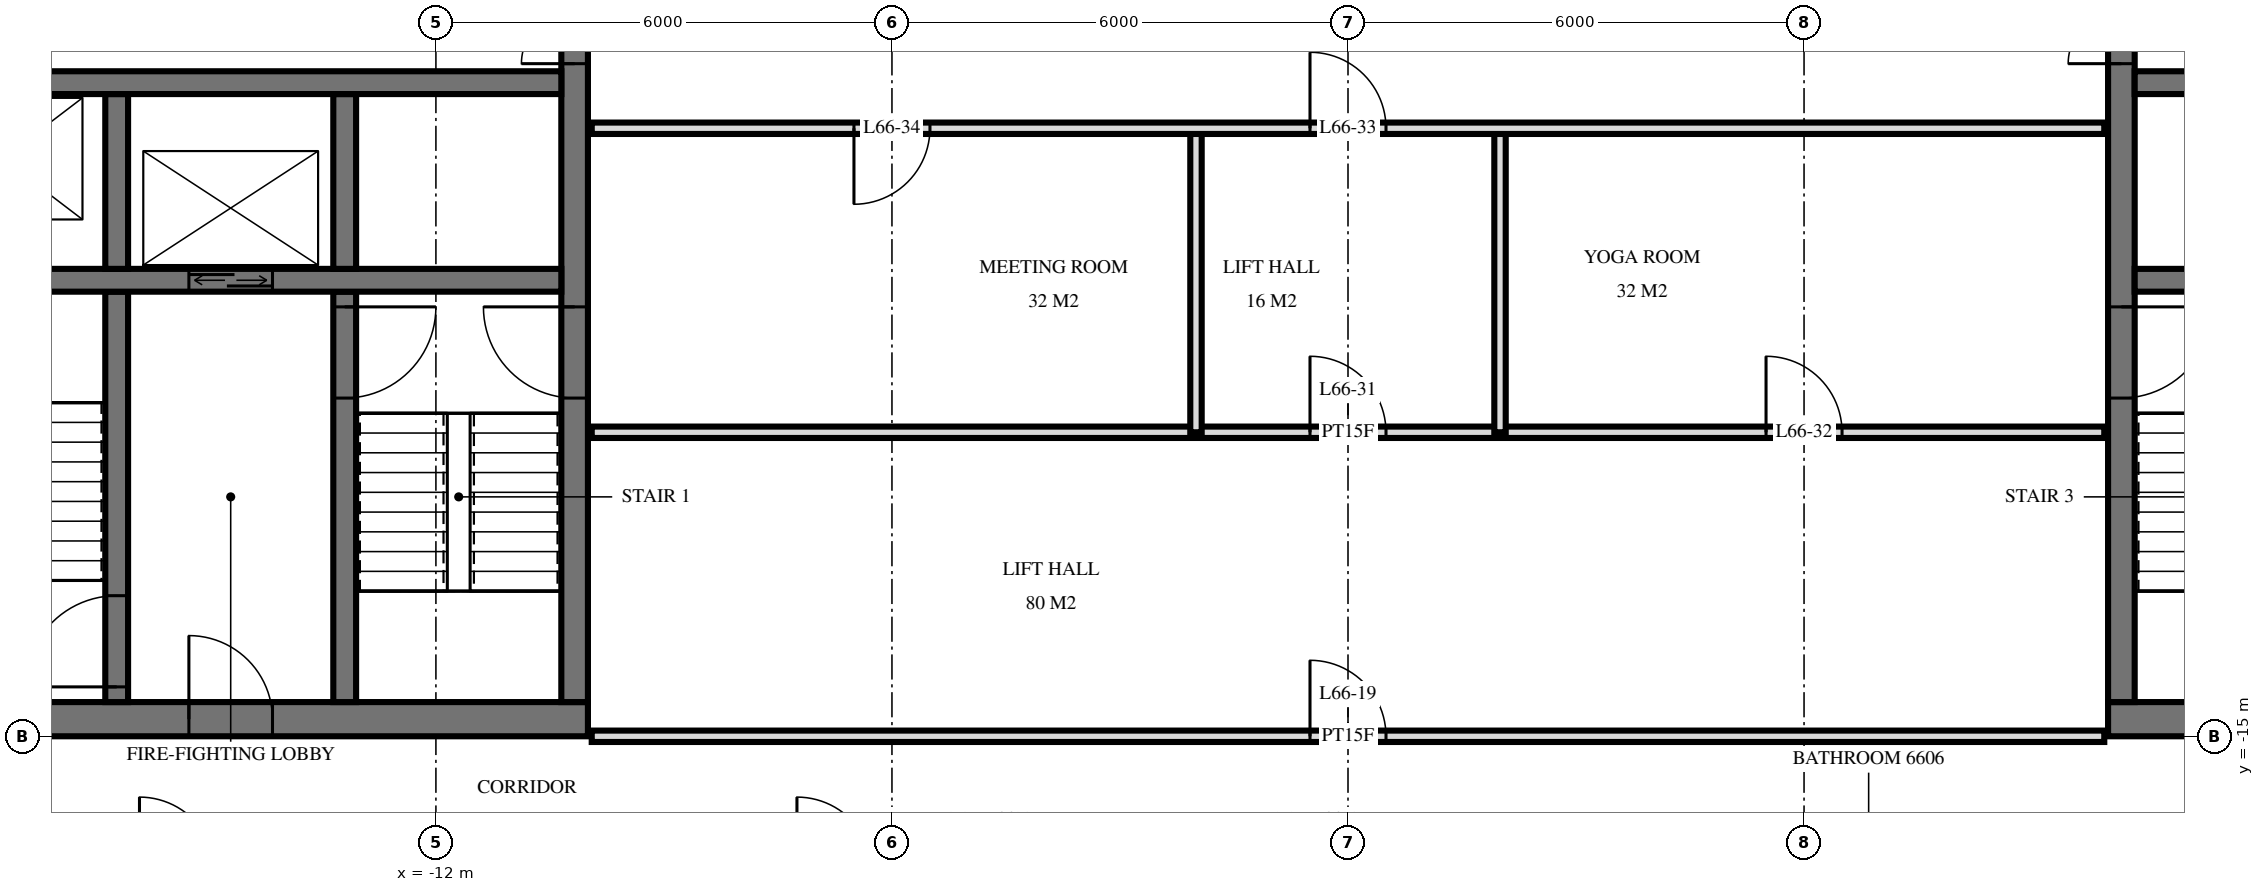
"""IFC4 building model, lengths in metres.
Left out: names, types, materials, properties, quantities, classifications, styles, units other than length and angle.
Written with IfcOpenShell. Run it as: python <this file> out.ifc"""

import sys

from ifc_helpers import new_model, si_unit, direction, frame, frame_2d, origin, place, context, subcontext, project, spatial, rectangle, extrude, element, fill, save


model = new_model("IFC4")
c1 = context("Model", 3, precision=1e-05, world=origin(), true_north=direction((0.0, 1.0)))
c2 = subcontext(c1, "Body", "Model", "MODEL_VIEW")
j1 = project(units=[si_unit("LENGTHUNIT", "METRE"), si_unit("PLANEANGLEUNIT", "RADIAN")], contexts=[c1])
p1 = place(None, origin())
s1 = spatial("IfcSite", under=j1, at=p1, CompositionType="ELEMENT")
p2 = place(p1, origin())
s2 = spatial("IfcBuilding", under=s1, at=p2, CompositionType="ELEMENT")
p3 = place(p2, frame((0.0, 0.0, 252.6)))
s3 = spatial("IfcBuildingStorey", under=s2, at=p3, CompositionType="ELEMENT", Elevation=252.6)
p4 = place(p3, frame((-19.5, -14.775, 0.0), z_axis=(0.0, 0.0, 1.0), x_axis=(1.0, 0.0, 0.0)))
e1 = element("IfcWall", 1, at=p4, inside=s3, PredefinedType="SHEAR", context=c2, shape_type="SweptSolid", body=[
    extrude(rectangle(XDim=9.5, YDim=0.45, at=frame_2d((4.75, 0.0))), origin(), (0.0, 0.0, 1.0), 3.5),
])
p5 = place(p4, frame((1.2, 0.0, 0.0)))
e2 = element("IfcOpeningElement", 2, at=p5, cuts=e1, PredefinedType="OPENING", context=c2, shape_type="SweptSolid", body=[
    extrude(rectangle(XDim=1.2, YDim=2.1, at=frame_2d((0.6, 1.05))), frame((0.0, 0.235, 0.0), z_axis=(0.0, -1.0, 0.0), x_axis=(1.0, 0.0, 0.0)), (0.0, 0.0, 1.0), 0.47),
])
p6 = place(p4, frame((4.25, 0.0, 0.0)))
e3 = element("IfcOpeningElement", 3, at=p6, cuts=e1, PredefinedType="OPENING", context=c2, shape_type="SweptSolid", body=[
    extrude(rectangle(XDim=1.1, YDim=2.1, at=frame_2d((0.55, 1.05))), frame((0.0, 0.235, 0.0), z_axis=(0.0, -1.0, 0.0), x_axis=(1.0, 0.0, 0.0)), (0.0, 0.0, 1.0), 0.47),
])
p7 = place(p3, frame((-10.175, -14.55, 0.0), z_axis=(0.0, 0.0, 1.0), x_axis=(0.0, 1.0, 0.0)))
e4 = element("IfcWall", 4, at=p7, inside=s3, PredefinedType="SHEAR", context=c2, shape_type="SweptSolid", body=[
    extrude(rectangle(XDim=14.1, YDim=0.35, at=frame_2d((7.05, 0.0))), origin(), (0.0, 0.0, 1.0), 3.5),
])
p8 = place(p7, frame((8.4, 0.0, 0.0)))
e5 = element("IfcOpeningElement", 5, at=p8, cuts=e4, PredefinedType="OPENING", context=c2, shape_type="SweptSolid", body=[
    extrude(rectangle(XDim=1.4, YDim=2.4, at=frame_2d((0.7, 1.2))), frame((0.0, 0.185, 0.0), z_axis=(0.0, -1.0, 0.0), x_axis=(1.0, 0.0, 0.0)), (0.0, 0.0, 1.0), 0.37),
])
p9 = place(p7, frame((10.0, 0.0, 0.0)))
e6 = element("IfcOpeningElement", 6, at=p9, cuts=e4, PredefinedType="OPENING", context=c2, shape_type="SweptSolid", body=[
    extrude(rectangle(XDim=1.4, YDim=2.4, at=frame_2d((0.7, 1.2))), frame((0.0, 0.185, 0.0), z_axis=(0.0, -1.0, 0.0), x_axis=(1.0, 0.0, 0.0)), (0.0, 0.0, 1.0), 0.37),
])
p10 = place(p7, frame((4.0, 0.0, 0.0)))
e7 = element("IfcOpeningElement", 7, at=p10, cuts=e4, PredefinedType="OPENING", context=c2, shape_type="SweptSolid", body=[
    extrude(rectangle(XDim=1.2, YDim=2.1, at=frame_2d((0.6, 1.05))), frame((0.0, 0.185, 0.0), z_axis=(0.0, -1.0, 0.0), x_axis=(1.0, 0.0, 0.0)), (0.0, 0.0, 1.0), 0.37),
])
p11 = place(p3, frame((-19.05, -6.4, 0.0), z_axis=(0.0, 0.0, 1.0), x_axis=(1.0, 0.0, 0.0)))
e8 = element("IfcWall", 8, at=p11, inside=s3, PredefinedType="SHEAR", context=c2, shape_type="SweptSolid", body=[
    extrude(rectangle(XDim=8.7, YDim=0.3, at=frame_2d((4.35, 0.0))), origin(), (0.0, 0.0, 1.0), 3.5),
])
p12 = place(p11, frame((0.8, 0.0, 0.0)))
e9 = element("IfcOpeningElement", 9, at=p12, cuts=e8, PredefinedType="OPENING", context=c2, shape_type="SweptSolid", body=[
    extrude(rectangle(XDim=1.1, YDim=2.1, at=frame_2d((0.55, 1.05))), frame((0.0, 0.16, 0.0), z_axis=(0.0, -1.0, 0.0), x_axis=(1.0, 0.0, 0.0)), (0.0, 0.0, 1.0), 0.32),
])
p13 = place(p3, frame((-19.05, -9.0, 0.0), z_axis=(0.0, 0.0, 1.0), x_axis=(1.0, 0.0, 0.0)))
e10 = element("IfcWall", 10, at=p13, inside=s3, PredefinedType="SHEAR", context=c2, shape_type="SweptSolid", body=[
    extrude(rectangle(XDim=8.7, YDim=0.3, at=frame_2d((4.35, 0.0))), origin(), (0.0, 0.0, 1.0), 3.5),
])
p14 = place(p13, frame((3.8, 0.0, 0.0)))
e11 = element("IfcOpeningElement", 11, at=p14, cuts=e10, PredefinedType="OPENING", context=c2, shape_type="SweptSolid", body=[
    extrude(rectangle(XDim=1.1, YDim=2.1, at=frame_2d((0.55, 1.05))), frame((0.0, 0.16, 0.0), z_axis=(0.0, -1.0, 0.0), x_axis=(1.0, 0.0, 0.0)), (0.0, 0.0, 1.0), 0.32),
])
p15 = place(p3, frame((-13.2, -8.85, 0.0), z_axis=(0.0, 0.0, 1.0), x_axis=(0.0, 1.0, 0.0)))
e12 = element("IfcWall", 12, at=p15, inside=s3, PredefinedType="SHEAR", context=c2, shape_type="SweptSolid", body=[
    extrude(rectangle(XDim=2.3, YDim=0.3, at=frame_2d((1.15, 0.0))), origin(), (0.0, 0.0, 1.0), 3.5),
])
p16 = place(p3, frame((-13.2, -14.55, 0.0), z_axis=(0.0, 0.0, 1.0), x_axis=(0.0, 1.0, 0.0)))
e13 = element("IfcWall", 13, at=p16, inside=s3, PredefinedType="SHEAR", context=c2, shape_type="SweptSolid", body=[
    extrude(rectangle(XDim=5.4, YDim=0.3, at=frame_2d((2.7, 0.0))), origin(), (0.0, 0.0, 1.0), 3.5),
])
p17 = place(p16, frame((4.0, 0.0, 0.0)))
e14 = element("IfcOpeningElement", 14, at=p17, cuts=e13, PredefinedType="OPENING", context=c2, shape_type="SweptSolid", body=[
    extrude(rectangle(XDim=1.2, YDim=2.1, at=frame_2d((0.6, 1.05))), frame((0.0, 0.16, 0.0), z_axis=(0.0, -1.0, 0.0), x_axis=(1.0, 0.0, 0.0)), (0.0, 0.0, 1.0), 0.32),
])
p18 = place(p3, frame((-16.2, -8.85, 0.0), z_axis=(0.0, 0.0, 1.0), x_axis=(0.0, 1.0, 0.0)))
e15 = element("IfcWall", 15, at=p18, inside=s3, PredefinedType="SHEAR", context=c2, shape_type="SweptSolid", body=[
    extrude(rectangle(XDim=2.3, YDim=0.3, at=frame_2d((1.15, 0.0))), origin(), (0.0, 0.0, 1.0), 3.5),
])
p19 = place(p3, frame((-16.2, -14.55, 0.0), z_axis=(0.0, 0.0, 1.0), x_axis=(0.0, 1.0, 0.0)))
e16 = element("IfcWall", 16, at=p19, inside=s3, PredefinedType="SHEAR", context=c2, shape_type="SweptSolid", body=[
    extrude(rectangle(XDim=5.4, YDim=0.3, at=frame_2d((2.7, 0.0))), origin(), (0.0, 0.0, 1.0), 3.5),
])
p20 = place(p19, frame((0.2, 0.0, 0.0)))
e17 = element("IfcOpeningElement", 17, at=p20, cuts=e16, PredefinedType="OPENING", context=c2, shape_type="SweptSolid", body=[
    extrude(rectangle(XDim=1.2, YDim=2.1, at=frame_2d((0.6, 1.05))), frame((0.0, 0.16, 0.0), z_axis=(0.0, -1.0, 0.0), x_axis=(1.0, 0.0, 0.0)), (0.0, 0.0, 1.0), 0.32),
])
p21 = place(p3, frame((10.0, -14.775, 0.0), z_axis=(0.0, 0.0, 1.0), x_axis=(1.0, 0.0, 0.0)))
e18 = element("IfcWall", 18, at=p21, inside=s3, PredefinedType="SHEAR", context=c2, shape_type="SweptSolid", body=[
    extrude(rectangle(XDim=9.5, YDim=0.45, at=frame_2d((4.75, 0.0))), origin(), (0.0, 0.0, 1.0), 3.5),
])
p22 = place(p21, frame((7.1, 0.0, 0.0)))
e19 = element("IfcOpeningElement", 19, at=p22, cuts=e18, PredefinedType="OPENING", context=c2, shape_type="SweptSolid", body=[
    extrude(rectangle(XDim=1.2, YDim=2.1, at=frame_2d((0.6, 1.05))), frame((0.0, 0.235, 0.0), z_axis=(0.0, -1.0, 0.0), x_axis=(1.0, 0.0, 0.0)), (0.0, 0.0, 1.0), 0.47),
])
p23 = place(p21, frame((4.15, 0.0, 0.0)))
e20 = element("IfcOpeningElement", 20, at=p23, cuts=e18, PredefinedType="OPENING", context=c2, shape_type="SweptSolid", body=[
    extrude(rectangle(XDim=1.1, YDim=2.1, at=frame_2d((0.55, 1.05))), frame((0.0, 0.235, 0.0), z_axis=(0.0, -1.0, 0.0), x_axis=(1.0, 0.0, 0.0)), (0.0, 0.0, 1.0), 0.47),
])
p24 = place(p3, frame((10.175, -14.55, 0.0), z_axis=(0.0, 0.0, 1.0), x_axis=(0.0, 1.0, 0.0)))
e21 = element("IfcWall", 21, at=p24, inside=s3, PredefinedType="SHEAR", context=c2, shape_type="SweptSolid", body=[
    extrude(rectangle(XDim=14.1, YDim=0.35, at=frame_2d((7.05, 0.0))), origin(), (0.0, 0.0, 1.0), 3.5),
])
p25 = place(p24, frame((8.4, 0.0, 0.0)))
e22 = element("IfcOpeningElement", 22, at=p25, cuts=e21, PredefinedType="OPENING", context=c2, shape_type="SweptSolid", body=[
    extrude(rectangle(XDim=1.4, YDim=2.4, at=frame_2d((0.7, 1.2))), frame((0.0, 0.185, 0.0), z_axis=(0.0, -1.0, 0.0), x_axis=(1.0, 0.0, 0.0)), (0.0, 0.0, 1.0), 0.37),
])
p26 = place(p24, frame((10.0, 0.0, 0.0)))
e23 = element("IfcOpeningElement", 23, at=p26, cuts=e21, PredefinedType="OPENING", context=c2, shape_type="SweptSolid", body=[
    extrude(rectangle(XDim=1.4, YDim=2.4, at=frame_2d((0.7, 1.2))), frame((0.0, 0.185, 0.0), z_axis=(0.0, -1.0, 0.0), x_axis=(1.0, 0.0, 0.0)), (0.0, 0.0, 1.0), 0.37),
])
p27 = place(p24, frame((4.0, 0.0, 0.0)))
e24 = element("IfcOpeningElement", 24, at=p27, cuts=e21, PredefinedType="OPENING", context=c2, shape_type="SweptSolid", body=[
    extrude(rectangle(XDim=1.2, YDim=2.1, at=frame_2d((0.6, 1.05))), frame((0.0, 0.185, 0.0), z_axis=(0.0, -1.0, 0.0), x_axis=(1.0, 0.0, 0.0)), (0.0, 0.0, 1.0), 0.37),
])
p28 = place(p3, frame((10.35, -6.4, 0.0), z_axis=(0.0, 0.0, 1.0), x_axis=(1.0, 0.0, 0.0)))
e25 = element("IfcWall", 25, at=p28, inside=s3, PredefinedType="SHEAR", context=c2, shape_type="SweptSolid", body=[
    extrude(rectangle(XDim=8.7, YDim=0.3, at=frame_2d((4.35, 0.0))), origin(), (0.0, 0.0, 1.0), 3.5),
])
p29 = place(p28, frame((6.8, 0.0, 0.0)))
e26 = element("IfcOpeningElement", 26, at=p29, cuts=e25, PredefinedType="OPENING", context=c2, shape_type="SweptSolid", body=[
    extrude(rectangle(XDim=1.1, YDim=2.1, at=frame_2d((0.55, 1.05))), frame((0.0, 0.16, 0.0), z_axis=(0.0, -1.0, 0.0), x_axis=(1.0, 0.0, 0.0)), (0.0, 0.0, 1.0), 0.32),
])
p30 = place(p3, frame((10.35, -9.0, 0.0), z_axis=(0.0, 0.0, 1.0), x_axis=(1.0, 0.0, 0.0)))
e27 = element("IfcWall", 27, at=p30, inside=s3, PredefinedType="SHEAR", context=c2, shape_type="SweptSolid", body=[
    extrude(rectangle(XDim=8.7, YDim=0.3, at=frame_2d((4.35, 0.0))), origin(), (0.0, 0.0, 1.0), 3.5),
])
p31 = place(p30, frame((3.8, 0.0, 0.0)))
e28 = element("IfcOpeningElement", 28, at=p31, cuts=e27, PredefinedType="OPENING", context=c2, shape_type="SweptSolid", body=[
    extrude(rectangle(XDim=1.1, YDim=2.1, at=frame_2d((0.55, 1.05))), frame((0.0, 0.16, 0.0), z_axis=(0.0, -1.0, 0.0), x_axis=(1.0, 0.0, 0.0)), (0.0, 0.0, 1.0), 0.32),
])
for number, where, z_axis, x_axis in (
    (29, (2.0, -11.0, 0.0), (0.0, 0.0, 1.0), (0.0, 1.0, 0.0)),
    (30, (-2.0, -11.0, 0.0), (0.0, 0.0, 1.0), (0.0, 1.0, 0.0)),
):
    element("IfcWall", number, at=place(p3, frame(where, z_axis=z_axis, x_axis=x_axis)), inside=s3, PredefinedType="PARTITIONING", context=c2, shape_type="SweptSolid", body=[
        extrude(rectangle(XDim=4.0, YDim=0.15, at=frame_2d((2.0, 0.0))), origin(), (0.0, 0.0, 1.0), 3.22),
    ])
p32 = place(p3, frame((-9.95, -15.0, 0.0), z_axis=(0.0, 0.0, 1.0), x_axis=(1.0, 0.0, 0.0)))
e31 = element("IfcWall", 31, at=p32, inside=s3, PredefinedType="PARTITIONING", context=c2, shape_type="SweptSolid", body=[
    extrude(rectangle(XDim=19.9, YDim=0.15, at=frame_2d((9.95, 0.0))), origin(), (0.0, 0.0, 1.0), 2.584),
])
p33 = place(p32, frame((9.45, 0.0, 0.0)))
e32 = element("IfcOpeningElement", 32, at=p33, cuts=e31, PredefinedType="OPENING", context=c2, shape_type="SweptSolid", body=[
    extrude(rectangle(XDim=1.0, YDim=2.1, at=frame_2d((0.5, 1.05))), frame((0.0, 0.085, 0.0), z_axis=(0.0, -1.0, 0.0), x_axis=(1.0, 0.0, 0.0)), (0.0, 0.0, 1.0), 0.17),
])
p34 = place(p3, frame((-9.95, -11.0, 0.0), z_axis=(0.0, 0.0, 1.0), x_axis=(1.0, 0.0, 0.0)))
e33 = element("IfcWall", 33, at=p34, inside=s3, PredefinedType="PARTITIONING", context=c2, shape_type="SweptSolid", body=[
    extrude(rectangle(XDim=19.9, YDim=0.15, at=frame_2d((9.95, 0.0))), origin(), (0.0, 0.0, 1.0), 3.22),
])
p35 = place(p34, frame((9.45, 0.0, 0.0)))
e34 = element("IfcOpeningElement", 34, at=p35, cuts=e33, PredefinedType="OPENING", context=c2, shape_type="SweptSolid", body=[
    extrude(rectangle(XDim=1.0, YDim=2.1, at=frame_2d((0.5, 1.05))), frame((0.0, 0.085, 0.0), z_axis=(0.0, -1.0, 0.0), x_axis=(1.0, 0.0, 0.0)), (0.0, 0.0, 1.0), 0.17),
])
p36 = place(p34, frame((15.45, 0.0, 0.0)))
e35 = element("IfcOpeningElement", 35, at=p36, cuts=e33, PredefinedType="OPENING", context=c2, shape_type="SweptSolid", body=[
    extrude(rectangle(XDim=1.0, YDim=2.1, at=frame_2d((0.5, 1.05))), frame((0.0, 0.085, 0.0), z_axis=(0.0, -1.0, 0.0), x_axis=(1.0, 0.0, 0.0)), (0.0, 0.0, 1.0), 0.17),
])
p37 = place(p3, frame((-9.95, -7.0, 0.0), z_axis=(0.0, 0.0, 1.0), x_axis=(1.0, 0.0, 0.0)))
e36 = element("IfcWall", 36, at=p37, inside=s3, PredefinedType="PARTITIONING", context=c2, shape_type="SweptSolid", body=[
    extrude(rectangle(XDim=19.9, YDim=0.15, at=frame_2d((9.95, 0.0))), origin(), (0.0, 0.0, 1.0), 3.22),
])
p38 = place(p37, frame((9.45, 0.0, 0.0)))
e37 = element("IfcOpeningElement", 37, at=p38, cuts=e36, PredefinedType="OPENING", context=c2, shape_type="SweptSolid", body=[
    extrude(rectangle(XDim=1.0, YDim=2.1, at=frame_2d((0.5, 1.05))), frame((0.0, 0.085, 0.0), z_axis=(0.0, -1.0, 0.0), x_axis=(1.0, 0.0, 0.0)), (0.0, 0.0, 1.0), 0.17),
])
p39 = place(p37, frame((3.45, 0.0, 0.0)))
e38 = element("IfcOpeningElement", 38, at=p39, cuts=e36, PredefinedType="OPENING", context=c2, shape_type="SweptSolid", body=[
    extrude(rectangle(XDim=1.0, YDim=2.1, at=frame_2d((0.5, 1.05))), frame((0.0, 0.085, 0.0), z_axis=(0.0, -1.0, 0.0), x_axis=(1.0, 0.0, 0.0)), (0.0, 0.0, 1.0), 0.17),
])
p40 = place(p14, origin())
e39 = element("IfcDoor", 39, at=p40, inside=s3, OperationType="DOUBLE_DOOR_SLIDING", PredefinedType="USERDEFINED", context=c2, shape_type="SweptSolid", body=[
    extrude(rectangle(XDim=1.1, YDim=2.1, at=frame_2d((0.55, 1.05))), frame((0.0, 0.025, 0.0), z_axis=(0.0, -1.0, 0.0), x_axis=(1.0, 0.0, 0.0)), (0.0, 0.0, 1.0), 0.05),
])
fill(e11, e39)
p41 = place(p8, origin())
e40 = element("IfcDoor", 40, at=p41, inside=s3, OperationType="DOUBLE_DOOR_SINGLE_SWING", PredefinedType="DOOR", context=c2, shape_type="SweptSolid", body=[
    extrude(rectangle(XDim=1.4, YDim=2.4, at=frame_2d((0.7, 1.2))), frame((0.0, 0.025, 0.0), z_axis=(0.0, -1.0, 0.0), x_axis=(1.0, 0.0, 0.0)), (0.0, 0.0, 1.0), 0.05),
])
fill(e5, e40)
p42 = place(p10, origin())
e41 = element("IfcDoor", 41, at=p42, inside=s3, OperationType="SINGLE_SWING_LEFT", PredefinedType="DOOR", context=c2, shape_type="SweptSolid", body=[
    extrude(rectangle(XDim=1.2, YDim=2.1, at=frame_2d((0.6, 1.05))), frame((0.0, 0.025, 0.0), z_axis=(0.0, -1.0, 0.0), x_axis=(1.0, 0.0, 0.0)), (0.0, 0.0, 1.0), 0.05),
])
fill(e7, e41)
p43 = place(p6, origin())
e42 = element("IfcDoor", 42, at=p43, inside=s3, OperationType="SINGLE_SWING_RIGHT", PredefinedType="DOOR", context=c2, shape_type="SweptSolid", body=[
    extrude(rectangle(XDim=1.1, YDim=2.1, at=frame_2d((0.55, 1.05))), frame((0.0, 0.025, 0.0), z_axis=(0.0, -1.0, 0.0), x_axis=(1.0, 0.0, 0.0)), (0.0, 0.0, 1.0), 0.05),
])
fill(e3, e42)
p44 = place(p17, frame((0.6, 0.0, 0.0), z_axis=(0.0, 0.0, 1.0), x_axis=(-1.0, 0.0, 0.0)))
e43 = element("IfcDoor", 43, at=p44, inside=s3, OperationType="SINGLE_SWING_RIGHT", PredefinedType="DOOR", context=c2, shape_type="SweptSolid", body=[
    extrude(rectangle(XDim=1.2, YDim=2.1, at=frame_2d((0.0, 1.05))), frame((0.0, -0.025, 0.0), z_axis=(0.0, 1.0, 0.0), x_axis=(-1.0, 0.0, 0.0)), (0.0, 0.0, 1.0), 0.05),
])
fill(e14, e43)
p45 = place(p20, origin())
e44 = element("IfcDoor", 44, at=p45, inside=s3, OperationType="SINGLE_SWING_RIGHT", PredefinedType="DOOR", context=c2, shape_type="SweptSolid", body=[
    extrude(rectangle(XDim=1.2, YDim=2.1, at=frame_2d((0.6, 1.05))), frame((0.0, 0.025, 0.0), z_axis=(0.0, -1.0, 0.0), x_axis=(1.0, 0.0, 0.0)), (0.0, 0.0, 1.0), 0.05),
])
fill(e17, e44)
p46 = place(p25, origin())
e45 = element("IfcDoor", 45, at=p46, inside=s3, OperationType="DOUBLE_DOOR_SINGLE_SWING", PredefinedType="DOOR", context=c2, shape_type="SweptSolid", body=[
    extrude(rectangle(XDim=1.4, YDim=2.4, at=frame_2d((0.7, 1.2))), frame((0.0, 0.025, 0.0), z_axis=(0.0, -1.0, 0.0), x_axis=(1.0, 0.0, 0.0)), (0.0, 0.0, 1.0), 0.05),
])
fill(e22, e45)
p47 = place(p27, frame((0.6, 0.0, 0.0), z_axis=(0.0, 0.0, 1.0), x_axis=(-1.0, 0.0, 0.0)))
e46 = element("IfcDoor", 46, at=p47, inside=s3, OperationType="SINGLE_SWING_RIGHT", PredefinedType="DOOR", context=c2, shape_type="SweptSolid", body=[
    extrude(rectangle(XDim=1.2, YDim=2.1, at=frame_2d((0.0, 1.05))), frame((0.0, -0.025, 0.0), z_axis=(0.0, 1.0, 0.0), x_axis=(-1.0, 0.0, 0.0)), (0.0, 0.0, 1.0), 0.05),
])
fill(e24, e46)
p48 = place(p33, origin())
e47 = element("IfcDoor", 47, at=p48, inside=s3, OperationType="SINGLE_SWING_RIGHT", PredefinedType="DOOR", context=c2, shape_type="SweptSolid", body=[
    extrude(rectangle(XDim=1.0, YDim=2.1, at=frame_2d((0.5, 1.05))), frame((0.0, 0.025, 0.0), z_axis=(0.0, -1.0, 0.0), x_axis=(1.0, 0.0, 0.0)), (0.0, 0.0, 1.0), 0.05),
])
fill(e32, e47)
p49 = place(p35, origin())
e48 = element("IfcDoor", 48, at=p49, inside=s3, OperationType="SINGLE_SWING_RIGHT", PredefinedType="DOOR", context=c2, shape_type="SweptSolid", body=[
    extrude(rectangle(XDim=1.0, YDim=2.1, at=frame_2d((0.5, 1.05))), frame((0.0, 0.025, 0.0), z_axis=(0.0, -1.0, 0.0), x_axis=(1.0, 0.0, 0.0)), (0.0, 0.0, 1.0), 0.05),
])
fill(e34, e48)
p50 = place(p36, origin())
e49 = element("IfcDoor", 49, at=p50, inside=s3, OperationType="SINGLE_SWING_RIGHT", PredefinedType="DOOR", context=c2, shape_type="SweptSolid", body=[
    extrude(rectangle(XDim=1.0, YDim=2.1, at=frame_2d((0.5, 1.05))), frame((0.0, 0.025, 0.0), z_axis=(0.0, -1.0, 0.0), x_axis=(1.0, 0.0, 0.0)), (0.0, 0.0, 1.0), 0.05),
])
fill(e35, e49)
p51 = place(p38, origin())
e50 = element("IfcDoor", 50, at=p51, inside=s3, OperationType="SINGLE_SWING_RIGHT", PredefinedType="DOOR", context=c2, shape_type="SweptSolid", body=[
    extrude(rectangle(XDim=1.0, YDim=2.1, at=frame_2d((0.5, 1.05))), frame((0.0, 0.025, 0.0), z_axis=(0.0, -1.0, 0.0), x_axis=(1.0, 0.0, 0.0)), (0.0, 0.0, 1.0), 0.05),
])
fill(e37, e50)
p52 = place(p39, frame((0.5, 0.0, 0.0), z_axis=(0.0, 0.0, 1.0), x_axis=(-1.0, 0.0, 0.0)))
e51 = element("IfcDoor", 51, at=p52, inside=s3, OperationType="SINGLE_SWING_LEFT", PredefinedType="DOOR", context=c2, shape_type="SweptSolid", body=[
    extrude(rectangle(XDim=1.0, YDim=2.1, at=frame_2d((0.0, 1.05))), frame((0.0, -0.025, 0.0), z_axis=(0.0, 1.0, 0.0), x_axis=(-1.0, 0.0, 0.0)), (0.0, 0.0, 1.0), 0.05),
])
fill(e38, e51)
save(model, sys.argv[1])
